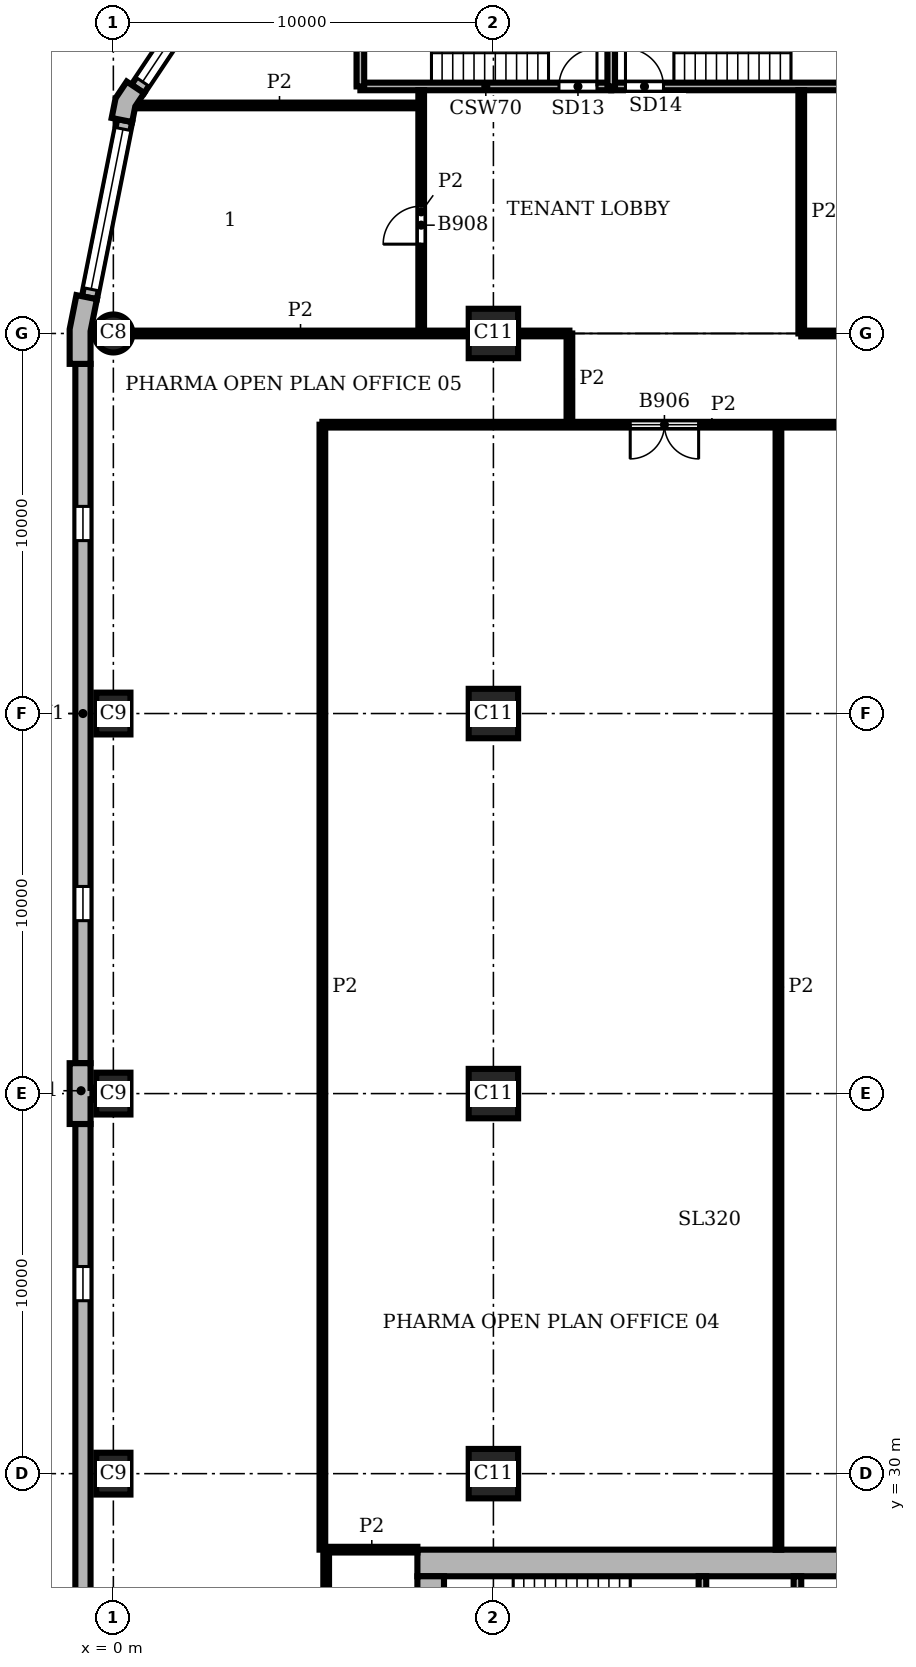
"""IFC4 building model, lengths in metres.
Left out: names, types, materials, properties, quantities, classifications, styles, units other than length and angle.
Written with IfcOpenShell. Run it as: python <this file> out.ifc"""

import sys

from ifc_helpers import new_model, si_unit, direction, frame, frame_2d, origin, origin_2d, place, context, subcontext, project, spatial, polyline, rectangle, circle, outline, extrude, element, fill, save


model = new_model("IFC4")
c1 = context("Model", 3, precision=1e-05, world=origin(), true_north=direction((0.0, 1.0)))
c2 = subcontext(c1, "Body", "Model", "MODEL_VIEW")
j1 = project(units=[si_unit("LENGTHUNIT", "METRE"), si_unit("PLANEANGLEUNIT", "RADIAN")], contexts=[c1])
p1 = place(None, origin())
s1 = spatial("IfcSite", under=j1, at=p1, CompositionType="ELEMENT")
p2 = place(p1, origin())
s2 = spatial("IfcBuilding", under=s1, at=p2, CompositionType="ELEMENT")
p3 = place(p2, frame((0.0, 0.0, 225.3)))
s3 = spatial("IfcBuildingStorey", under=s2, at=p3, CompositionType="ELEMENT", Elevation=225.3)
p4 = place(p3, frame((0.0, 60.0, 0.0), z_axis=(0.0, 0.0, 1.0), x_axis=(1.0, 0.0, 0.0)))
e1 = element("IfcColumn", 1, at=p4, inside=s3, PredefinedType="COLUMN", context=c2, shape_type="SweptSolid", body=[
    extrude(circle(Radius=0.5, at=origin_2d()), origin(), (0.0, 0.0, 1.0), 3.9),
])
for number, where, z_axis, x_axis in (
    (2, (0.0, 50.0, 0.0), (0.0, 0.0, 1.0), (0.0, 1.0, 0.0)),
    (3, (0.0, 40.0, 0.0), (0.0, 0.0, 1.0), (0.0, 1.0, 0.0)),
    (4, (0.0, 30.0, 0.0), (0.0, 0.0, 1.0), (0.0, 1.0, 0.0)),
):
    element("IfcColumn", number, at=place(p3, frame(where, z_axis=z_axis, x_axis=x_axis)), inside=s3, PredefinedType="COLUMN", context=c2, shape_type="SweptSolid", body=[
        extrude(rectangle(XDim=1.1, YDim=0.9, at=origin_2d()), origin(), (0.0, 0.0, 1.0), 3.9),
    ])
for number, where, z_axis, x_axis in (
    (5, (10.0, 30.0, 0.0), (0.0, 0.0, 1.0), (1.0, 0.0, 0.0)),
    (6, (10.0, 40.0, 0.0), (0.0, 0.0, 1.0), (1.0, 0.0, 0.0)),
    (7, (10.0, 50.0, 0.0), (0.0, 0.0, 1.0), (1.0, 0.0, 0.0)),
    (8, (10.0, 60.0, 0.0), (0.0, 0.0, 1.0), (1.0, 0.0, 0.0)),
):
    element("IfcColumn", number, at=place(p3, frame(where, z_axis=z_axis, x_axis=x_axis)), inside=s3, PredefinedType="COLUMN", context=c2, shape_type="SweptSolid", body=[
        extrude(rectangle(XDim=1.3, YDim=1.3, at=origin_2d()), origin(), (0.0, 0.0, 1.0), 3.9),
    ])
p5 = place(p3, frame((28.0, 27.65, 0.0), z_axis=(0.0, 0.0, 1.0), x_axis=(-1.0, 0.0, 0.0)))
e9 = element("IfcWall", 9, at=p5, inside=s3, PredefinedType="SHEAR", context=c2, shape_type="SweptSolid", body=[
    extrude(rectangle(XDim=20.0, YDim=0.7, at=frame_2d((10.0, 0.0))), origin(), (0.0, 0.0, 1.0), 3.9),
])
p6 = place(p3, frame((8.35, 27.3, 0.0), z_axis=(0.0, 0.0, 1.0), x_axis=(0.0, -1.0, 0.0)))
e10 = element("IfcWall", 10, at=p6, inside=s3, PredefinedType="SHEAR", context=c2, shape_type="SweptSolid", body=[
    extrude(rectangle(XDim=18.6, YDim=0.7, at=frame_2d((9.3, 0.0))), origin(), (0.0, 0.0, 1.0), 3.9),
])
p7 = place(p3, origin())
e11 = element("IfcWall", 11, at=p7, inside=s3, PredefinedType="SOLIDWALL", context=c2, shape_type="SweptSolid", body=[
    extrude(outline(polyline([(0.477, 66.545), (0.352, 66.629), (0.059, 66.189), (-0.045, 65.67), (0.103, 65.641), (0.495, 65.563), (0.577, 65.974), (0.81, 66.323), (0.477, 66.545)])), origin(), (0.0, 0.0, 1.0), 3.9),
])
e12 = element("IfcWall", 12, at=p7, inside=s3, PredefinedType="SOLIDWALL", context=c2, shape_type="SweptSolid", body=[
    extrude(outline(polyline([(-0.825, 60.98), (-0.972, 61.009), (-1.15, 60.113), (-1.15, 59.2), (-1.0, 59.2), (-0.6, 59.2), (-0.6, 60.059), (-0.432, 60.902), (-0.825, 60.98)])), origin(), (0.0, 0.0, 1.0), 3.9),
])
e13 = element("IfcWall", 13, at=p7, inside=s3, PredefinedType="SOLIDWALL", context=c2, shape_type="SweptSolid", body=[
    extrude(outline(polyline([(-0.6, 39.2), (-0.6, 39.85), (-0.55, 39.85), (-0.55, 40.15), (-0.6, 40.15), (-0.6, 40.8), (-1.0, 40.8), (-1.15, 40.8), (-1.15, 40.0), (-1.15, 39.2), (-1.0, 39.2), (-0.6, 39.2)])), origin(), (0.0, 0.0, 1.0), 3.9),
])
p8 = place(p3, frame((3.284, 70.386, 0.0), z_axis=(0.0, 0.0, 1.0), x_axis=(-0.555541552266, -0.831488775454, 0.0)))
e14 = element("IfcWall", 14, at=p8, inside=s3, PredefinedType="SOLIDWALL", context=c2, shape_type="SweptSolid", body=[
    extrude(rectangle(XDim=4.753, YDim=0.4, at=frame_2d((2.376, 0.0))), origin(), (0.0, 0.0, 1.0), 3.9),
])
p9 = place(p8, frame((0.226, 0.0, 0.9)))
e15 = element("IfcOpeningElement", 15, at=p9, cuts=e14, PredefinedType="OPENING", context=c2, shape_type="SweptSolid", body=[
    extrude(rectangle(XDim=4.3, YDim=2.35, at=frame_2d((2.15, 1.175))), frame((0.0, 0.21, 0.0), z_axis=(0.0, -1.0, 0.0), x_axis=(1.0, 0.0, 0.0)), (0.0, 0.0, 1.0), 0.42),
])
p10 = place(p3, frame((0.299, 65.602, 0.0), z_axis=(0.0, 0.0, 1.0), x_axis=(-0.195098533057, -0.98078364709, 0.0)))
e16 = element("IfcWall", 16, at=p10, inside=s3, PredefinedType="SOLIDWALL", context=c2, shape_type="SweptSolid", body=[
    extrude(rectangle(XDim=4.753, YDim=0.4, at=frame_2d((2.376, 0.0))), origin(), (0.0, 0.0, 1.0), 3.9),
])
p11 = place(p10, frame((0.226, 0.0, 0.9)))
e17 = element("IfcOpeningElement", 17, at=p11, cuts=e16, PredefinedType="OPENING", context=c2, shape_type="SweptSolid", body=[
    extrude(rectangle(XDim=4.3, YDim=2.35, at=frame_2d((2.15, 1.175))), frame((0.0, 0.21, 0.0), z_axis=(0.0, -1.0, 0.0), x_axis=(1.0, 0.0, 0.0)), (0.0, 0.0, 1.0), 0.42),
])
p12 = place(p3, frame((-0.8, 59.2, 0.0), z_axis=(0.0, 0.0, 1.0), x_axis=(0.0, -1.0, 0.0)))
e18 = element("IfcWall", 18, at=p12, inside=s3, PredefinedType="SOLIDWALL", context=c2, shape_type="SweptSolid", body=[
    extrude(rectangle(XDim=18.4, YDim=0.4, at=frame_2d((9.2, 0.0))), origin(), (0.0, 0.0, 1.0), 3.9),
])
p13 = place(p12, frame((3.75, 0.0, 0.9)))
e19 = element("IfcOpeningElement", 19, at=p13, cuts=e18, PredefinedType="OPENING", context=c2, shape_type="SweptSolid", body=[
    extrude(rectangle(XDim=0.9, YDim=2.35, at=frame_2d((0.45, 1.175))), frame((0.0, 0.21, 0.0), z_axis=(0.0, -1.0, 0.0), x_axis=(1.0, 0.0, 0.0)), (0.0, 0.0, 1.0), 0.42),
])
p14 = place(p12, frame((13.75, 0.0, 0.9)))
e20 = element("IfcOpeningElement", 20, at=p14, cuts=e18, PredefinedType="OPENING", context=c2, shape_type="SweptSolid", body=[
    extrude(rectangle(XDim=0.9, YDim=2.35, at=frame_2d((0.45, 1.175))), frame((0.0, 0.21, 0.0), z_axis=(0.0, -1.0, 0.0), x_axis=(1.0, 0.0, 0.0)), (0.0, 0.0, 1.0), 0.42),
])
p15 = place(p3, frame((-0.8, 39.2, 0.0), z_axis=(0.0, 0.0, 1.0), x_axis=(0.0, -1.0, 0.0)))
e21 = element("IfcWall", 21, at=p15, inside=s3, PredefinedType="SOLIDWALL", context=c2, shape_type="SweptSolid", body=[
    extrude(rectangle(XDim=18.4, YDim=0.4, at=frame_2d((9.2, 0.0))), origin(), (0.0, 0.0, 1.0), 3.9),
])
p16 = place(p15, frame((3.75, 0.0, 0.9)))
e22 = element("IfcOpeningElement", 22, at=p16, cuts=e21, PredefinedType="OPENING", context=c2, shape_type="SweptSolid", body=[
    extrude(rectangle(XDim=0.9, YDim=2.35, at=frame_2d((0.45, 1.175))), frame((0.0, 0.21, 0.0), z_axis=(0.0, -1.0, 0.0), x_axis=(1.0, 0.0, 0.0)), (0.0, 0.0, 1.0), 0.42),
])
p17 = place(p15, frame((13.75, 0.0, 0.9)))
e23 = element("IfcOpeningElement", 23, at=p17, cuts=e21, PredefinedType="OPENING", context=c2, shape_type="SweptSolid", body=[
    extrude(rectangle(XDim=0.9, YDim=2.35, at=frame_2d((0.45, 1.175))), frame((0.0, 0.21, 0.0), z_axis=(0.0, -1.0, 0.0), x_axis=(1.0, 0.0, 0.0)), (0.0, 0.0, 1.0), 0.42),
])
p18 = place(p3, frame((6.5, 66.5, 0.0), z_axis=(0.0, 0.0, 1.0), x_axis=(1.0, 0.0, 0.0)))
e24 = element("IfcWall", 24, at=p18, inside=s3, PredefinedType="SHEAR", context=c2, shape_type="SweptSolid", body=[
    extrude(rectangle(XDim=6.6, YDim=0.2, at=frame_2d((3.3, 0.0))), origin(), (0.0, 0.0, 1.0), 3.58),
])
p19 = place(p18, frame((5.225, 0.0, 0.0)))
e25 = element("IfcOpeningElement", 25, at=p19, cuts=e24, PredefinedType="OPENING", context=c2, shape_type="SweptSolid", body=[
    extrude(rectangle(XDim=1.0, YDim=2.1, at=frame_2d((0.5, 1.05))), frame((0.0, 0.11, 0.0), z_axis=(0.0, -1.0, 0.0), x_axis=(1.0, 0.0, 0.0)), (0.0, 0.0, 1.0), 0.22),
])
p20 = place(p3, frame((13.1, 66.5, 0.0), z_axis=(0.0, 0.0, 1.0), x_axis=(1.0, 0.0, 0.0)))
e26 = element("IfcWall", 26, at=p20, inside=s3, PredefinedType="SHEAR", context=c2, shape_type="SweptSolid", body=[
    extrude(rectangle(XDim=6.6, YDim=0.2, at=frame_2d((3.3, 0.0))), origin(), (0.0, 0.0, 1.0), 3.58),
])
p21 = place(p20, frame((0.375, 0.0, 0.0)))
e27 = element("IfcOpeningElement", 27, at=p21, cuts=e26, PredefinedType="OPENING", context=c2, shape_type="SweptSolid", body=[
    extrude(rectangle(XDim=1.0, YDim=2.1, at=frame_2d((0.5, 1.05))), frame((0.0, 0.11, 0.0), z_axis=(0.0, -1.0, 0.0), x_axis=(1.0, 0.0, 0.0)), (0.0, 0.0, 1.0), 0.22),
])
for number, where, z_axis, x_axis in (
    (28, (6.5, 66.5, 0.0), (0.0, 0.0, 1.0), (0.0, 1.0, 0.0)),
    (29, (13.1, 66.5, 0.0), (0.0, 0.0, 1.0), (0.0, 1.0, 0.0)),
):
    element("IfcWall", number, at=place(p3, frame(where, z_axis=z_axis, x_axis=x_axis)), inside=s3, PredefinedType="SHEAR", context=c2, shape_type="SweptSolid", body=[
        extrude(rectangle(XDim=3.3, YDim=0.2, at=frame_2d((1.65, 0.0))), origin(), (0.0, 0.0, 1.0), 3.58),
    ])
p22 = place(p3, frame((15.5, 23.6, 0.0), z_axis=(0.0, 0.0, 1.0), x_axis=(0.0, 1.0, 0.0)))
e30 = element("IfcWall", 30, at=p22, inside=s3, PredefinedType="SHEAR", context=c2, shape_type="SweptSolid", body=[
    extrude(rectangle(XDim=3.7, YDim=0.2, at=frame_2d((1.85, 0.0))), origin(), (0.0, 0.0, 1.0), 3.58),
])
p23 = place(p3, frame((18.0, 20.0, 0.0), z_axis=(0.0, 0.0, 1.0), x_axis=(0.0, 1.0, 0.0)))
e31 = element("IfcWall", 31, at=p23, inside=s3, PredefinedType="SHEAR", context=c2, shape_type="SweptSolid", body=[
    extrude(rectangle(XDim=7.3, YDim=0.2, at=frame_2d((3.65, 0.0))), origin(), (0.0, 0.0, 1.0), 3.58),
])
p24 = place(p23, frame((1.2, 0.0, 0.0)))
e32 = element("IfcOpeningElement", 32, at=p24, cuts=e31, PredefinedType="OPENING", context=c2, shape_type="SweptSolid", body=[
    extrude(rectangle(XDim=1.2, YDim=2.1, at=frame_2d((0.6, 1.05))), frame((0.0, 0.11, 0.0), z_axis=(0.0, -1.0, 0.0), x_axis=(1.0, 0.0, 0.0)), (0.0, 0.0, 1.0), 0.22),
])
p25 = place(p3, frame((5.5, 28.0, 0.0), z_axis=(0.0, 0.0, 1.0), x_axis=(0.0, 1.0, 0.0)))
e33 = element("IfcWall", 33, at=p25, inside=s3, PredefinedType="PARTITIONING", context=c2, shape_type="SweptSolid", body=[
    extrude(rectangle(XDim=29.6, YDim=0.15, at=frame_2d((14.8, 0.0))), origin(), (0.0, 0.0, 1.0), 3.58),
])
p26 = place(p3, frame((5.6, 5.6, 0.0), z_axis=(0.0, 0.0, 1.0), x_axis=(0.0, 1.0, 0.0)))
e34 = element("IfcWall", 34, at=p26, inside=s3, PredefinedType="PARTITIONING", context=c2, shape_type="SweptSolid", body=[
    extrude(rectangle(XDim=22.4, YDim=0.15, at=frame_2d((11.2, 0.0))), origin(), (0.0, 0.0, 1.0), 3.58),
])
p27 = place(p26, frame((5.35, 0.0, 0.0)))
e35 = element("IfcOpeningElement", 35, at=p27, cuts=e34, PredefinedType="OPENING", context=c2, shape_type="SweptSolid", body=[
    extrude(rectangle(XDim=0.8, YDim=2.1, at=frame_2d((0.4, 1.05))), frame((0.0, 0.085, 0.0), z_axis=(0.0, -1.0, 0.0), x_axis=(1.0, 0.0, 0.0)), (0.0, 0.0, 1.0), 0.17),
])
p28 = place(p26, frame((11.5, 0.0, 0.0)))
e36 = element("IfcOpeningElement", 36, at=p28, cuts=e34, PredefinedType="OPENING", context=c2, shape_type="SweptSolid", body=[
    extrude(rectangle(XDim=0.8, YDim=2.1, at=frame_2d((0.4, 1.05))), frame((0.0, 0.085, 0.0), z_axis=(0.0, -1.0, 0.0), x_axis=(1.0, 0.0, 0.0)), (0.0, 0.0, 1.0), 0.17),
])
p29 = place(p26, frame((17.75, 0.0, 0.0)))
e37 = element("IfcOpeningElement", 37, at=p29, cuts=e34, PredefinedType="OPENING", context=c2, shape_type="SweptSolid", body=[
    extrude(rectangle(XDim=1.8, YDim=2.1, at=frame_2d((0.9, 1.05))), frame((0.0, 0.085, 0.0), z_axis=(0.0, -1.0, 0.0), x_axis=(1.0, 0.0, 0.0)), (0.0, 0.0, 1.0), 0.17),
])
p30 = place(p3, frame((8.1, 60.0, 0.0), z_axis=(0.0, 0.0, 1.0), x_axis=(0.0, 1.0, 0.0)))
e38 = element("IfcWall", 38, at=p30, inside=s3, PredefinedType="PARTITIONING", context=c2, shape_type="SweptSolid", body=[
    extrude(rectangle(XDim=6.4, YDim=0.15, at=frame_2d((3.2, 0.0))), origin(), (0.0, 0.0, 1.0), 3.58),
])
p31 = place(p30, frame((2.35, 0.0, 0.0)))
e39 = element("IfcOpeningElement", 39, at=p31, cuts=e38, PredefinedType="OPENING", context=c2, shape_type="SweptSolid", body=[
    extrude(rectangle(XDim=1.0, YDim=2.1, at=frame_2d((0.5, 1.05))), frame((0.0, 0.085, 0.0), z_axis=(0.0, -1.0, 0.0), x_axis=(1.0, 0.0, 0.0)), (0.0, 0.0, 1.0), 0.17),
])
p32 = place(p3, frame((12.0, 57.6, 0.0), z_axis=(0.0, 0.0, 1.0), x_axis=(0.0, 1.0, 0.0)))
e40 = element("IfcWall", 40, at=p32, inside=s3, PredefinedType="PARTITIONING", context=c2, shape_type="SweptSolid", body=[
    extrude(rectangle(XDim=2.4, YDim=0.15, at=frame_2d((1.2, 0.0))), origin(), (0.0, 0.0, 1.0), 3.58),
])
p33 = place(p3, frame((17.5, 28.0, 0.0), z_axis=(0.0, 0.0, 1.0), x_axis=(0.0, 1.0, 0.0)))
e41 = element("IfcWall", 41, at=p33, inside=s3, PredefinedType="PARTITIONING", context=c2, shape_type="SweptSolid", body=[
    extrude(rectangle(XDim=29.6, YDim=0.15, at=frame_2d((14.8, 0.0))), origin(), (0.0, 0.0, 1.0), 3.58),
])
p34 = place(p3, frame((18.1, 60.0, 0.0), z_axis=(0.0, 0.0, 1.0), x_axis=(0.0, 1.0, 0.0)))
e42 = element("IfcWall", 42, at=p34, inside=s3, PredefinedType="PARTITIONING", context=c2, shape_type="SweptSolid", body=[
    extrude(rectangle(XDim=6.4, YDim=0.15, at=frame_2d((3.2, 0.0))), origin(), (0.0, 0.0, 1.0), 3.58),
])
p35 = place(p3, frame((5.6, 28.0, 0.0), z_axis=(0.0, 0.0, 1.0), x_axis=(1.0, 0.0, 0.0)))
e43 = element("IfcWall", 43, at=p35, inside=s3, PredefinedType="PARTITIONING", context=c2, shape_type="SweptSolid", body=[
    extrude(rectangle(XDim=2.4, YDim=0.15, at=frame_2d((1.2, 0.0))), origin(), (0.0, 0.0, 1.0), 3.58),
])
p36 = place(p3, frame((5.5, 57.6, 0.0), z_axis=(0.0, 0.0, 1.0), x_axis=(1.0, 0.0, 0.0)))
e44 = element("IfcWall", 44, at=p36, inside=s3, PredefinedType="PARTITIONING", context=c2, shape_type="SweptSolid", body=[
    extrude(rectangle(XDim=20.5, YDim=0.15, at=frame_2d((10.25, 0.0))), origin(), (0.0, 0.0, 1.0), 3.58),
])
p37 = place(p36, frame((8.1, 0.0, 0.0)))
e45 = element("IfcOpeningElement", 45, at=p37, cuts=e44, PredefinedType="OPENING", context=c2, shape_type="SweptSolid", body=[
    extrude(rectangle(XDim=1.8, YDim=2.1, at=frame_2d((0.9, 1.05))), frame((0.0, 0.085, 0.0), z_axis=(0.0, -1.0, 0.0), x_axis=(1.0, 0.0, 0.0)), (0.0, 0.0, 1.0), 0.17),
])
p38 = place(p3, frame((0.5, 60.0, 0.0), z_axis=(0.0, 0.0, 1.0), x_axis=(1.0, 0.0, 0.0)))
e46 = element("IfcWall", 46, at=p38, inside=s3, PredefinedType="PARTITIONING", context=c2, shape_type="SweptSolid", body=[
    extrude(rectangle(XDim=8.85, YDim=0.15, at=frame_2d((4.425, 0.0))), origin(), (0.0, 0.0, 1.0), 3.58),
])
p39 = place(p3, frame((10.65, 60.0, 0.0), z_axis=(0.0, 0.0, 1.0), x_axis=(1.0, 0.0, 0.0)))
e47 = element("IfcWall", 47, at=p39, inside=s3, PredefinedType="PARTITIONING", context=c2, shape_type="SweptSolid", body=[
    extrude(rectangle(XDim=1.35, YDim=0.15, at=frame_2d((0.675, 0.0))), origin(), (0.0, 0.0, 1.0), 3.58),
])
p40 = place(p3, frame((18.1, 60.0, 0.0), z_axis=(0.0, 0.0, 1.0), x_axis=(1.0, 0.0, 0.0)))
e48 = element("IfcWall", 48, at=p40, inside=s3, PredefinedType="PARTITIONING", context=c2, shape_type="SweptSolid", body=[
    extrude(rectangle(XDim=1.25, YDim=0.15, at=frame_2d((0.625, 0.0))), origin(), (0.0, 0.0, 1.0), 3.58),
])
p41 = place(p3, frame((0.644, 66.0, 0.0), z_axis=(0.0, 0.0, 1.0), x_axis=(1.0, 0.0, 0.0)))
e49 = element("IfcWall", 49, at=p41, inside=s3, PredefinedType="PARTITIONING", context=c2, shape_type="SweptSolid", body=[
    extrude(rectangle(XDim=7.456, YDim=0.15, at=frame_2d((3.728, 0.0))), origin(), (0.0, 0.0, 1.0), 3.58),
])
p42 = place(p9, origin())
e50 = element("IfcWindow", 50, at=p42, inside=s3, PartitioningType="SINGLE_PANEL", PredefinedType="WINDOW", context=c2, shape_type="SweptSolid", body=[
    extrude(rectangle(XDim=4.3, YDim=2.35, at=frame_2d((2.15, 1.175))), frame((0.0, 0.16, 0.0), z_axis=(0.0, -1.0, 0.0), x_axis=(1.0, 0.0, 0.0)), (0.0, 0.0, 1.0), 0.06),
])
fill(e15, e50)
p43 = place(p11, origin())
e51 = element("IfcWindow", 51, at=p43, inside=s3, PartitioningType="SINGLE_PANEL", PredefinedType="WINDOW", context=c2, shape_type="SweptSolid", body=[
    extrude(rectangle(XDim=4.3, YDim=2.35, at=frame_2d((2.15, 1.175))), frame((0.0, 0.16, 0.0), z_axis=(0.0, -1.0, 0.0), x_axis=(1.0, 0.0, 0.0)), (0.0, 0.0, 1.0), 0.06),
])
fill(e17, e51)
p44 = place(p13, origin())
e52 = element("IfcWindow", 52, at=p44, inside=s3, PartitioningType="SINGLE_PANEL", PredefinedType="WINDOW", context=c2, shape_type="SweptSolid", body=[
    extrude(rectangle(XDim=0.9, YDim=2.35, at=frame_2d((0.45, 1.175))), frame((0.0, 0.16, 0.0), z_axis=(0.0, -1.0, 0.0), x_axis=(1.0, 0.0, 0.0)), (0.0, 0.0, 1.0), 0.06),
])
fill(e19, e52)
p45 = place(p14, origin())
e53 = element("IfcWindow", 53, at=p45, inside=s3, PartitioningType="SINGLE_PANEL", PredefinedType="WINDOW", context=c2, shape_type="SweptSolid", body=[
    extrude(rectangle(XDim=0.9, YDim=2.35, at=frame_2d((0.45, 1.175))), frame((0.0, 0.16, 0.0), z_axis=(0.0, -1.0, 0.0), x_axis=(1.0, 0.0, 0.0)), (0.0, 0.0, 1.0), 0.06),
])
fill(e20, e53)
p46 = place(p16, origin())
e54 = element("IfcWindow", 54, at=p46, inside=s3, PartitioningType="SINGLE_PANEL", PredefinedType="WINDOW", context=c2, shape_type="SweptSolid", body=[
    extrude(rectangle(XDim=0.9, YDim=2.35, at=frame_2d((0.45, 1.175))), frame((0.0, 0.16, 0.0), z_axis=(0.0, -1.0, 0.0), x_axis=(1.0, 0.0, 0.0)), (0.0, 0.0, 1.0), 0.06),
])
fill(e22, e54)
p47 = place(p19, origin())
e55 = element("IfcDoor", 55, at=p47, inside=s3, OperationType="SINGLE_SWING_RIGHT", PredefinedType="DOOR", context=c2, shape_type="SweptSolid", body=[
    extrude(rectangle(XDim=1.0, YDim=2.1, at=frame_2d((0.5, 1.05))), frame((0.0, 0.025, 0.0), z_axis=(0.0, -1.0, 0.0), x_axis=(1.0, 0.0, 0.0)), (0.0, 0.0, 1.0), 0.05),
])
fill(e25, e55)
p48 = place(p21, origin())
e56 = element("IfcDoor", 56, at=p48, inside=s3, OperationType="SINGLE_SWING_LEFT", PredefinedType="DOOR", context=c2, shape_type="SweptSolid", body=[
    extrude(rectangle(XDim=1.0, YDim=2.1, at=frame_2d((0.5, 1.05))), frame((0.0, 0.025, 0.0), z_axis=(0.0, -1.0, 0.0), x_axis=(1.0, 0.0, 0.0)), (0.0, 0.0, 1.0), 0.05),
])
fill(e27, e56)
p49 = place(p37, frame((1.8, 0.0, 0.0), z_axis=(0.0, 0.0, 1.0), x_axis=(-1.0, 0.0, 0.0)))
e57 = element("IfcDoor", 57, at=p49, inside=s3, OperationType="DOUBLE_DOOR_SINGLE_SWING", PredefinedType="DOOR", context=c2, shape_type="SweptSolid", body=[
    extrude(rectangle(XDim=1.8, YDim=2.1, at=frame_2d((0.9, 1.05))), frame((0.0, 0.025, 0.0), z_axis=(0.0, -1.0, 0.0), x_axis=(1.0, 0.0, 0.0)), (0.0, 0.0, 1.0), 0.05),
])
fill(e45, e57)
p50 = place(p31, origin())
e58 = element("IfcDoor", 58, at=p50, inside=s3, OperationType="SINGLE_SWING_LEFT", PredefinedType="DOOR", context=c2, shape_type="SweptSolid", body=[
    extrude(rectangle(XDim=1.0, YDim=2.1, at=frame_2d((0.5, 1.05))), frame((0.0, 0.025, 0.0), z_axis=(0.0, -1.0, 0.0), x_axis=(1.0, 0.0, 0.0)), (0.0, 0.0, 1.0), 0.05),
])
fill(e39, e58)
save(model, sys.argv[1])
